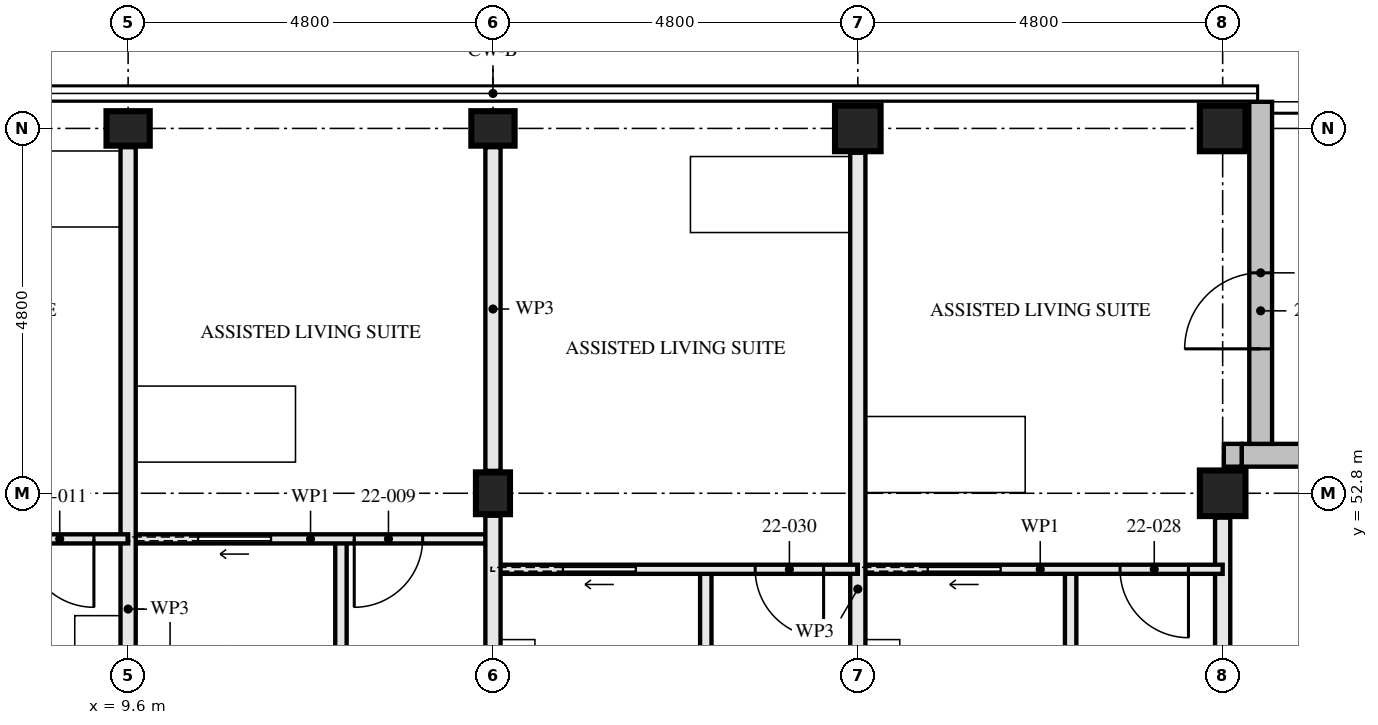
"""IFC4 building model, lengths in metres.
Left out: names, types, materials, properties, quantities, classifications, styles, units other than length and angle.
Written with IfcOpenShell. Run it as: python <this file> out.ifc"""

import sys

from ifc_helpers import new_model, si_unit, direction, frame, frame_2d, origin, origin_2d, place, context, subcontext, project, spatial, rectangle, hollow_rectangle, i_section, extrude, element, fill, save


model = new_model("IFC4")
c1 = context("Model", 3, precision=1e-05, world=origin(), true_north=direction((0.0, 1.0)))
c2 = subcontext(c1, "Body", "Model", "MODEL_VIEW")
j1 = project(units=[si_unit("LENGTHUNIT", "METRE"), si_unit("PLANEANGLEUNIT", "RADIAN")], contexts=[c1])
p1 = place(None, origin())
s1 = spatial("IfcSite", under=j1, at=p1, CompositionType="ELEMENT")
p2 = place(p1, origin())
s2 = spatial("IfcBuilding", under=s1, at=p2, CompositionType="ELEMENT")
p3 = place(p2, frame((0.0, 0.0, 84.0)))
s3 = spatial("IfcBuildingStorey", under=s2, at=p3, CompositionType="ELEMENT", Elevation=84.0)
p4 = place(p3, frame((9.6, 57.6, 0.0), z_axis=(0.0, 0.0, 1.0), x_axis=(0.0, 1.0, 0.0)))
e1 = element("IfcColumn", 1, at=p4, inside=s3, PredefinedType="COLUMN", context=c2, shape_type="SweptSolid", body=[
    extrude(i_section(OverallWidth=0.454, OverallDepth=0.569, WebThickness=0.078, FlangeThickness=0.125, FilletRadius=0.015, at=origin_2d()), origin(), (0.0, 0.0, 1.0), 3.5),
])
p5 = place(p3, frame((14.4, 52.8, 0.0), z_axis=(0.0, 0.0, 1.0), x_axis=(1.0, 0.0, 0.0)))
e2 = element("IfcColumn", 2, at=p5, inside=s3, PredefinedType="COLUMN", context=c2, shape_type="SweptSolid", body=[
    extrude(i_section(OverallWidth=0.448, OverallDepth=0.55, WebThickness=0.072, FlangeThickness=0.115, FilletRadius=0.015, at=origin_2d()), origin(), (0.0, 0.0, 1.0), 3.5),
])
p6 = place(p3, frame((14.4, 57.6, 0.0), z_axis=(0.0, 0.0, 1.0), x_axis=(0.0, 1.0, 0.0)))
e3 = element("IfcColumn", 3, at=p6, inside=s3, PredefinedType="COLUMN", context=c2, shape_type="SweptSolid", body=[
    extrude(i_section(OverallWidth=0.454, OverallDepth=0.569, WebThickness=0.078, FlangeThickness=0.125, FilletRadius=0.015, at=origin_2d()), origin(), (0.0, 0.0, 1.0), 3.5),
])
for number, where, z_axis, x_axis in (
    (4, (19.2, 57.6, 0.0), (0.0, 0.0, 1.0), (0.0, 1.0, 0.0)),
    (5, (24.0, 52.8, 0.0), (0.0, 0.0, 1.0), (0.0, 1.0, 0.0)),
    (6, (24.0, 57.6, 0.0), (0.0, 0.0, 1.0), (0.0, 1.0, 0.0)),
):
    element("IfcColumn", number, at=place(p3, frame(where, z_axis=z_axis, x_axis=x_axis)), inside=s3, PredefinedType="COLUMN", context=c2, shape_type="SweptSolid", body=[
        extrude(hollow_rectangle(XDim=0.6, YDim=0.6, WallThickness=0.08, at=origin_2d()), origin(), (0.0, 0.0, 1.0), 3.5),
    ])
p7 = place(p3, frame((29.15, 53.3, 0.0), z_axis=(0.0, 0.0, 1.0), x_axis=(-1.0, 0.0, 0.0)))
e7 = element("IfcWall", 7, at=p7, inside=s3, PredefinedType="SOLIDWALL", context=c2, shape_type="SweptSolid", body=[
    extrude(rectangle(XDim=4.9, YDim=0.3, at=frame_2d((2.45, 0.0))), origin(), (0.0, 0.0, 1.0), 3.5),
])
p8 = place(p7, frame((2.25, 0.0, 0.0)))
e8 = element("IfcOpeningElement", 8, at=p8, cuts=e7, PredefinedType="OPENING", context=c2, shape_type="SweptSolid", body=[
    extrude(rectangle(XDim=1.0, YDim=2.4, at=frame_2d((0.5, 1.2))), frame((0.0, 0.161, 0.0), z_axis=(0.0, -1.0, 0.0), x_axis=(1.0, 0.0, 0.0)), (0.0, 0.0, 1.0), 0.321),
])
p9 = place(p3, frame((24.5, 53.45, 0.0), z_axis=(0.0, 0.0, 1.0), x_axis=(0.0, 1.0, 0.0)))
e9 = element("IfcWall", 9, at=p9, inside=s3, PredefinedType="SOLIDWALL", context=c2, shape_type="SweptSolid", body=[
    extrude(rectangle(XDim=4.5, YDim=0.3, at=frame_2d((2.25, 0.0))), origin(), (0.0, 0.0, 1.0), 3.5),
])
p10 = place(p9, frame((1.25, 0.0, 0.0)))
e10 = element("IfcOpeningElement", 10, at=p10, cuts=e9, PredefinedType="OPENING", context=c2, shape_type="SweptSolid", body=[
    extrude(rectangle(XDim=1.0, YDim=2.4, at=frame_2d((0.5, 1.2))), frame((0.0, 0.161, 0.0), z_axis=(0.0, -1.0, 0.0), x_axis=(1.0, 0.0, 0.0)), (0.0, 0.0, 1.0), 0.321),
])
p11 = place(p3, frame((24.25, 53.3, 2.39), z_axis=(0.0, 0.0, 1.0), x_axis=(-1.0, 0.0, 0.0)))
e11 = element("IfcWall", 11, at=p11, inside=s3, PredefinedType="SOLIDWALL", context=c2, shape_type="SweptSolid", body=[
    extrude(rectangle(XDim=0.235, YDim=0.3, at=frame_2d((0.118, 0.0))), origin(), (0.0, 0.0, 1.0), 0.88),
])
p12 = place(p3, frame((12.4, 52.2, 0.0), z_axis=(0.0, 0.0, 1.0), x_axis=(0.0, -1.0, 0.0)))
e12 = element("IfcWall", 12, at=p12, inside=s3, PredefinedType="PARTITIONING", context=c2, shape_type="SweptSolid", body=[
    extrude(rectangle(XDim=3.0, YDim=0.15, at=frame_2d((1.5, 0.0))), origin(), (0.0, 0.0, 1.0), 3.33),
])
p13 = place(p3, frame((14.4, 52.2, 0.0), z_axis=(0.0, 0.0, 1.0), x_axis=(-1.0, 0.0, 0.0)))
e13 = element("IfcWall", 13, at=p13, inside=s3, PredefinedType="PARTITIONING", context=c2, shape_type="SweptSolid", body=[
    extrude(rectangle(XDim=4.8, YDim=0.12, at=frame_2d((2.4, 0.0))), origin(), (0.0, 0.0, 1.0), 3.33),
])
p14 = place(p13, frame((0.925, 0.0, 0.0)))
e14 = element("IfcOpeningElement", 14, at=p14, cuts=e13, PredefinedType="OPENING", context=c2, shape_type="SweptSolid", body=[
    extrude(rectangle(XDim=0.9, YDim=2.1, at=frame_2d((0.45, 1.05))), frame((0.0, 0.071, 0.0), z_axis=(0.0, -1.0, 0.0), x_axis=(1.0, 0.0, 0.0)), (0.0, 0.0, 1.0), 0.141),
])
p15 = place(p13, frame((2.925, 0.0, 0.0)))
e15 = element("IfcOpeningElement", 15, at=p15, cuts=e13, PredefinedType="OPENING", context=c2, shape_type="SweptSolid", body=[
    extrude(rectangle(XDim=0.95, YDim=2.1, at=frame_2d((0.475, 1.05))), frame((0.0, 0.071, 0.0), z_axis=(0.0, -1.0, 0.0), x_axis=(1.0, 0.0, 0.0)), (0.0, 0.0, 1.0), 0.141),
])
p16 = place(p3, frame((9.6, 57.353, 0.0), z_axis=(0.0, 0.0, 1.0), x_axis=(0.0, -1.0, 0.0)))
e16 = element("IfcWall", 16, at=p16, inside=s3, PredefinedType="PARTITIONING", context=c2, shape_type="SweptSolid", body=[
    extrude(rectangle(XDim=12.153, YDim=0.2, at=frame_2d((6.077, 0.0))), origin(), (0.0, 0.0, 1.0), 2.55),
])
p17 = place(p3, frame((9.6, 52.2, 0.0), z_axis=(0.0, 0.0, 1.0), x_axis=(-1.0, 0.0, 0.0)))
e17 = element("IfcWall", 17, at=p17, inside=s3, PredefinedType="PARTITIONING", context=c2, shape_type="SweptSolid", body=[
    extrude(rectangle(XDim=4.8, YDim=0.12, at=frame_2d((2.4, 0.0))), origin(), (0.0, 0.0, 1.0), 3.33),
])
p18 = place(p17, frame((0.45, 0.0, 0.0)))
e18 = element("IfcOpeningElement", 18, at=p18, cuts=e17, PredefinedType="OPENING", context=c2, shape_type="SweptSolid", body=[
    extrude(rectangle(XDim=0.9, YDim=2.1, at=frame_2d((0.45, 1.05))), frame((0.0, 0.071, 0.0), z_axis=(0.0, -1.0, 0.0), x_axis=(1.0, 0.0, 0.0)), (0.0, 0.0, 1.0), 0.141),
])
p19 = place(p17, frame((2.925, 0.0, 0.0)))
e19 = element("IfcOpeningElement", 19, at=p19, cuts=e17, PredefinedType="OPENING", context=c2, shape_type="SweptSolid", body=[
    extrude(rectangle(XDim=0.95, YDim=2.1, at=frame_2d((0.475, 1.05))), frame((0.0, 0.071, 0.0), z_axis=(0.0, -1.0, 0.0), x_axis=(1.0, 0.0, 0.0)), (0.0, 0.0, 1.0), 0.141),
])
p20 = place(p3, frame((24.0, 52.48, 0.0), z_axis=(0.0, 0.0, 1.0), x_axis=(0.0, -1.0, 0.0)))
e20 = element("IfcWall", 20, at=p20, inside=s3, PredefinedType="PARTITIONING", context=c2, shape_type="SweptSolid", body=[
    extrude(rectangle(XDim=6.68, YDim=0.2, at=frame_2d((3.34, 0.0))), origin(), (0.0, 0.0, 1.0), 2.55),
])
p21 = place(p3, frame((22.0, 51.8, 0.0), z_axis=(0.0, 0.0, 1.0), x_axis=(0.0, -1.0, 0.0)))
e21 = element("IfcWall", 21, at=p21, inside=s3, PredefinedType="PARTITIONING", context=c2, shape_type="SweptSolid", body=[
    extrude(rectangle(XDim=3.0, YDim=0.15, at=frame_2d((1.5, 0.0))), origin(), (0.0, 0.0, 1.0), 3.33),
])
p22 = place(p3, frame((24.0, 51.8, 0.0), z_axis=(0.0, 0.0, 1.0), x_axis=(-1.0, 0.0, 0.0)))
e22 = element("IfcWall", 22, at=p22, inside=s3, PredefinedType="PARTITIONING", context=c2, shape_type="SweptSolid", body=[
    extrude(rectangle(XDim=4.8, YDim=0.12, at=frame_2d((2.4, 0.0))), origin(), (0.0, 0.0, 1.0), 3.33),
])
p23 = place(p22, frame((0.45, 0.0, 0.0)))
e23 = element("IfcOpeningElement", 23, at=p23, cuts=e22, PredefinedType="OPENING", context=c2, shape_type="SweptSolid", body=[
    extrude(rectangle(XDim=0.9, YDim=2.1, at=frame_2d((0.45, 1.05))), frame((0.0, 0.071, 0.0), z_axis=(0.0, -1.0, 0.0), x_axis=(1.0, 0.0, 0.0)), (0.0, 0.0, 1.0), 0.141),
])
p24 = place(p22, frame((2.925, 0.0, 0.0)))
e24 = element("IfcOpeningElement", 24, at=p24, cuts=e22, PredefinedType="OPENING", context=c2, shape_type="SweptSolid", body=[
    extrude(rectangle(XDim=0.95, YDim=2.1, at=frame_2d((0.475, 1.05))), frame((0.0, 0.071, 0.0), z_axis=(0.0, -1.0, 0.0), x_axis=(1.0, 0.0, 0.0)), (0.0, 0.0, 1.0), 0.141),
])
p25 = place(p3, frame((19.2, 57.28, 0.0), z_axis=(0.0, 0.0, 1.0), x_axis=(0.0, -1.0, 0.0)))
e25 = element("IfcWall", 25, at=p25, inside=s3, PredefinedType="PARTITIONING", context=c2, shape_type="SweptSolid", body=[
    extrude(rectangle(XDim=11.48, YDim=0.2, at=frame_2d((5.74, 0.0))), origin(), (0.0, 0.0, 1.0), 2.55),
])
p26 = place(p3, frame((17.2, 51.8, 0.0), z_axis=(0.0, 0.0, 1.0), x_axis=(0.0, -1.0, 0.0)))
e26 = element("IfcWall", 26, at=p26, inside=s3, PredefinedType="PARTITIONING", context=c2, shape_type="SweptSolid", body=[
    extrude(rectangle(XDim=3.0, YDim=0.15, at=frame_2d((1.5, 0.0))), origin(), (0.0, 0.0, 1.0), 3.33),
])
p27 = place(p3, frame((19.2, 51.8, 0.0), z_axis=(0.0, 0.0, 1.0), x_axis=(-1.0, 0.0, 0.0)))
e27 = element("IfcWall", 27, at=p27, inside=s3, PredefinedType="PARTITIONING", context=c2, shape_type="SweptSolid", body=[
    extrude(rectangle(XDim=4.8, YDim=0.12, at=frame_2d((2.4, 0.0))), origin(), (0.0, 0.0, 1.0), 3.33),
])
p28 = place(p27, frame((0.45, 0.0, 0.0)))
e28 = element("IfcOpeningElement", 28, at=p28, cuts=e27, PredefinedType="OPENING", context=c2, shape_type="SweptSolid", body=[
    extrude(rectangle(XDim=0.9, YDim=2.1, at=frame_2d((0.45, 1.05))), frame((0.0, 0.071, 0.0), z_axis=(0.0, -1.0, 0.0), x_axis=(1.0, 0.0, 0.0)), (0.0, 0.0, 1.0), 0.141),
])
p29 = place(p27, frame((2.925, 0.0, 0.0)))
e29 = element("IfcOpeningElement", 29, at=p29, cuts=e27, PredefinedType="OPENING", context=c2, shape_type="SweptSolid", body=[
    extrude(rectangle(XDim=0.95, YDim=2.1, at=frame_2d((0.475, 1.05))), frame((0.0, 0.071, 0.0), z_axis=(0.0, -1.0, 0.0), x_axis=(1.0, 0.0, 0.0)), (0.0, 0.0, 1.0), 0.141),
])
p30 = place(p3, frame((14.4, 48.295, 0.0), z_axis=(0.0, 0.0, 1.0), x_axis=(0.0, 1.0, 0.0)))
e30 = element("IfcWall", 30, at=p30, inside=s3, PredefinedType="PARTITIONING", context=c2, shape_type="SweptSolid", body=[
    extrude(rectangle(XDim=4.21, YDim=0.2, at=frame_2d((2.105, 0.0))), origin(), (0.0, 0.0, 1.0), 2.32),
])
p31 = place(p3, frame((14.4, 53.095, 0.0), z_axis=(0.0, 0.0, 1.0), x_axis=(0.0, 1.0, 0.0)))
e31 = element("IfcWall", 31, at=p31, inside=s3, PredefinedType="PARTITIONING", context=c2, shape_type="SweptSolid", body=[
    extrude(rectangle(XDim=4.258, YDim=0.2, at=frame_2d((2.129, 0.0))), origin(), (0.0, 0.0, 1.0), 2.32),
])
p32 = place(p10, origin())
e32 = element("IfcDoor", 32, at=p32, inside=s3, OperationType="SINGLE_SWING_LEFT", PredefinedType="DOOR", context=c2, shape_type="SweptSolid", body=[
    extrude(rectangle(XDim=1.0, YDim=2.4, at=frame_2d((0.5, 1.2))), frame((0.0, 0.035, 0.0), z_axis=(0.0, -1.0, 0.0), x_axis=(1.0, 0.0, 0.0)), (0.0, 0.0, 1.0), 0.07),
])
fill(e10, e32)
p33 = place(p14, origin())
e33 = element("IfcDoor", 33, at=p33, inside=s3, OperationType="SINGLE_SWING_LEFT", PredefinedType="DOOR", context=c2, shape_type="SweptSolid", body=[
    extrude(rectangle(XDim=0.9, YDim=2.1, at=frame_2d((0.45, 1.05))), frame((0.0, 0.022, 0.0), z_axis=(0.0, -1.0, 0.0), x_axis=(1.0, 0.0, 0.0)), (0.0, 0.0, 1.0), 0.044),
])
fill(e14, e33)
p34 = place(p15, origin())
e34 = element("IfcDoor", 34, at=p34, inside=s3, OperationType="SLIDING_TO_LEFT", PredefinedType="DOOR", context=c2, shape_type="SweptSolid", body=[
    extrude(rectangle(XDim=0.95, YDim=2.1, at=frame_2d((0.475, 1.05))), frame((0.0, 0.022, 0.0), z_axis=(0.0, -1.0, 0.0), x_axis=(1.0, 0.0, 0.0)), (0.0, 0.0, 1.0), 0.044),
])
fill(e15, e34)
p35 = place(p18, origin())
e35 = element("IfcDoor", 35, at=p35, inside=s3, OperationType="SINGLE_SWING_RIGHT", PredefinedType="DOOR", context=c2, shape_type="SweptSolid", body=[
    extrude(rectangle(XDim=0.9, YDim=2.1, at=frame_2d((0.45, 1.05))), frame((0.0, 0.022, 0.0), z_axis=(0.0, -1.0, 0.0), x_axis=(1.0, 0.0, 0.0)), (0.0, 0.0, 1.0), 0.044),
])
fill(e18, e35)
p36 = place(p23, origin())
e36 = element("IfcDoor", 36, at=p36, inside=s3, OperationType="SINGLE_SWING_RIGHT", PredefinedType="DOOR", context=c2, shape_type="SweptSolid", body=[
    extrude(rectangle(XDim=0.9, YDim=2.1, at=frame_2d((0.45, 1.05))), frame((0.0, 0.022, 0.0), z_axis=(0.0, -1.0, 0.0), x_axis=(1.0, 0.0, 0.0)), (0.0, 0.0, 1.0), 0.044),
])
fill(e23, e36)
p37 = place(p24, origin())
e37 = element("IfcDoor", 37, at=p37, inside=s3, OperationType="SLIDING_TO_LEFT", PredefinedType="DOOR", context=c2, shape_type="SweptSolid", body=[
    extrude(rectangle(XDim=0.95, YDim=2.1, at=frame_2d((0.475, 1.05))), frame((0.0, 0.022, 0.0), z_axis=(0.0, -1.0, 0.0), x_axis=(1.0, 0.0, 0.0)), (0.0, 0.0, 1.0), 0.044),
])
fill(e24, e37)
p38 = place(p28, origin())
e38 = element("IfcDoor", 38, at=p38, inside=s3, OperationType="SINGLE_SWING_RIGHT", PredefinedType="DOOR", context=c2, shape_type="SweptSolid", body=[
    extrude(rectangle(XDim=0.9, YDim=2.1, at=frame_2d((0.45, 1.05))), frame((0.0, 0.022, 0.0), z_axis=(0.0, -1.0, 0.0), x_axis=(1.0, 0.0, 0.0)), (0.0, 0.0, 1.0), 0.044),
])
fill(e28, e38)
p39 = place(p29, origin())
e39 = element("IfcDoor", 39, at=p39, inside=s3, OperationType="SLIDING_TO_LEFT", PredefinedType="DOOR", context=c2, shape_type="SweptSolid", body=[
    extrude(rectangle(XDim=0.95, YDim=2.1, at=frame_2d((0.475, 1.05))), frame((0.0, 0.022, 0.0), z_axis=(0.0, -1.0, 0.0), x_axis=(1.0, 0.0, 0.0)), (0.0, 0.0, 1.0), 0.044),
])
fill(e29, e39)
save(model, sys.argv[1])
